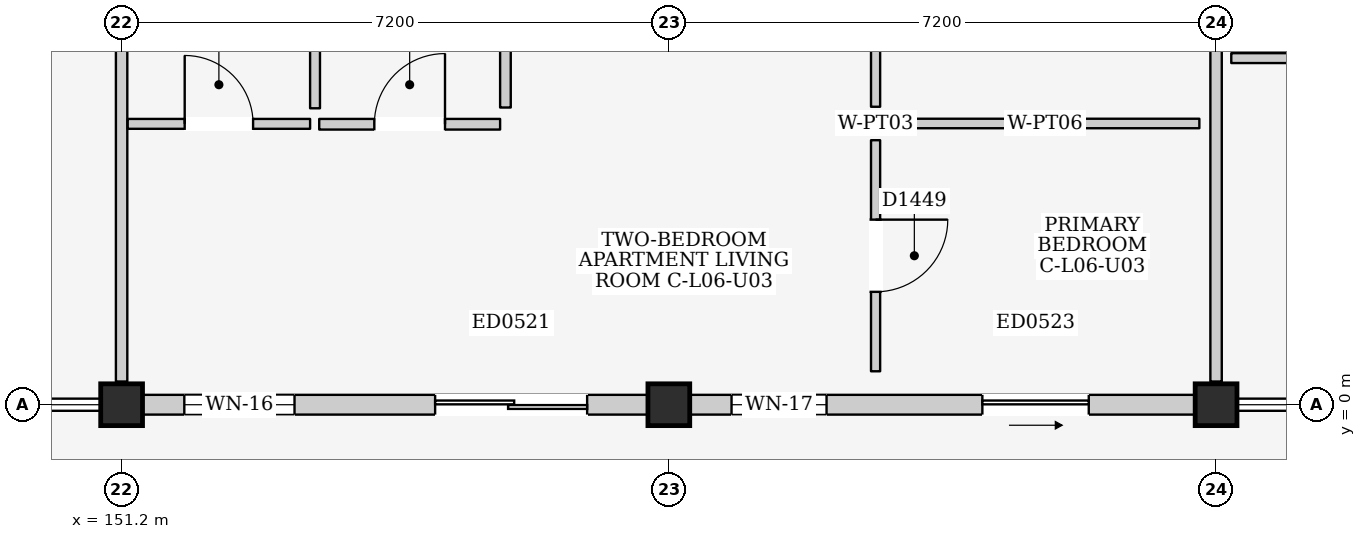
"""IFC4 building model, lengths in metres.
Left out: names, types, materials, properties, quantities, classifications, styles, units other than length and angle.
Written with IfcOpenShell. Run it as: python <this file> out.ifc"""

import sys

from ifc_helpers import new_model, si_unit, direction, frame, frame_2d, origin, origin_2d, place, context, subcontext, project, spatial, rectangle, extrude, element, fill, save


model = new_model("IFC4")
c1 = context("Model", 3, precision=1e-05, world=origin(), true_north=direction((0.0, 1.0)))
c2 = subcontext(c1, "Body", "Model", "MODEL_VIEW")
j1 = project(units=[si_unit("LENGTHUNIT", "METRE"), si_unit("PLANEANGLEUNIT", "RADIAN")], contexts=[c1])
p1 = place(None, origin())
s1 = spatial("IfcSite", under=j1, at=p1, CompositionType="ELEMENT")
p2 = place(p1, origin())
s2 = spatial("IfcBuilding", under=s1, at=p2, CompositionType="ELEMENT")
p3 = place(p2, frame((0.0, 0.0, 21.9)))
s3 = spatial("IfcBuildingStorey", under=s2, at=p3, CompositionType="ELEMENT", Elevation=21.9)
for number, where, z_axis, x_axis in (
    (1, (151.2, 0.0, 0.0), (0.0, 0.0, 1.0), (1.0, 0.0, 0.0)),
    (2, (158.4, 0.0, 0.0), (0.0, 0.0, 1.0), (1.0, 0.0, 0.0)),
    (3, (165.6, 0.0, 0.0), (0.0, 0.0, 1.0), (1.0, 0.0, 0.0)),
):
    element("IfcColumn", number, at=place(p3, frame(where, z_axis=z_axis, x_axis=x_axis)), inside=s3, PredefinedType="COLUMN", context=c2, shape_type="SweptSolid", body=[
        extrude(rectangle(XDim=0.55, YDim=0.55, at=origin_2d()), origin(), (0.0, 0.0, 1.0), 3.2),
    ])
p4 = place(p3, frame((151.475, 0.0, 0.0), z_axis=(0.0, 0.0, 1.0), x_axis=(1.0, 0.0, 0.0)))
e4 = element("IfcWall", 4, at=p4, inside=s3, PredefinedType="ELEMENTEDWALL", context=c2, shape_type="SweptSolid", body=[
    extrude(rectangle(XDim=6.65, YDim=0.26, at=frame_2d((3.325, 0.0))), origin(), (0.0, 0.0, 1.0), 2.515),
])
p5 = place(p4, frame((3.85, 0.0, 0.0)))
e5 = element("IfcOpeningElement", 5, at=p5, cuts=e4, PredefinedType="OPENING", context=c2, shape_type="SweptSolid", body=[
    extrude(rectangle(XDim=2.0, YDim=2.12, at=frame_2d((1.0, 1.06))), frame((0.0, 0.145, 0.0), z_axis=(0.0, -1.0, 0.0), x_axis=(1.0, 0.0, 0.0)), (0.0, 0.0, 1.0), 0.29),
])
p6 = place(p4, frame((0.55, 0.0, 0.9)))
e6 = element("IfcOpeningElement", 6, at=p6, cuts=e4, PredefinedType="OPENING", context=c2, shape_type="SweptSolid", body=[
    extrude(rectangle(XDim=1.45, YDim=1.4, at=frame_2d((0.725, 0.7))), frame((0.0, 0.145, 0.0), z_axis=(0.0, -1.0, 0.0), x_axis=(1.0, 0.0, 0.0)), (0.0, 0.0, 1.0), 0.29),
])
p7 = place(p3, frame((158.675, 0.0, 0.0), z_axis=(0.0, 0.0, 1.0), x_axis=(1.0, 0.0, 0.0)))
e7 = element("IfcWall", 7, at=p7, inside=s3, PredefinedType="ELEMENTEDWALL", context=c2, shape_type="SweptSolid", body=[
    extrude(rectangle(XDim=6.65, YDim=0.26, at=frame_2d((3.325, 0.0))), origin(), (0.0, 0.0, 1.0), 2.515),
])
p8 = place(p7, frame((3.85, 0.0, 0.0)))
e8 = element("IfcOpeningElement", 8, at=p8, cuts=e7, PredefinedType="OPENING", context=c2, shape_type="SweptSolid", body=[
    extrude(rectangle(XDim=1.4, YDim=2.1, at=frame_2d((0.7, 1.05))), frame((0.0, 0.145, 0.0), z_axis=(0.0, -1.0, 0.0), x_axis=(1.0, 0.0, 0.0)), (0.0, 0.0, 1.0), 0.29),
])
p9 = place(p7, frame((0.55, 0.0, 0.9)))
e9 = element("IfcOpeningElement", 9, at=p9, cuts=e7, PredefinedType="OPENING", context=c2, shape_type="SweptSolid", body=[
    extrude(rectangle(XDim=1.25, YDim=1.3, at=frame_2d((0.625, 0.65))), frame((0.0, 0.145, 0.0), z_axis=(0.0, -1.0, 0.0), x_axis=(1.0, 0.0, 0.0)), (0.0, 0.0, 1.0), 0.29),
])
for number, where, z_axis, x_axis in (
    (10, (151.2, 0.305, 0.0), (0.0, 0.0, 1.0), (0.0, 1.0, 0.0)),
    (11, (165.6, 0.305, 0.0), (0.0, 0.0, 1.0), (0.0, 1.0, 0.0)),
):
    element("IfcWall", number, at=place(p3, frame(where, z_axis=z_axis, x_axis=x_axis)), inside=s3, PredefinedType="PARTITIONING", context=c2, shape_type="SweptSolid", body=[
        extrude(rectangle(XDim=6.59, YDim=0.15, at=frame_2d((3.295, 0.0))), origin(), (0.0, 0.0, 1.0), 2.465),
    ])
p10 = place(p3, frame((151.28, 3.695, 0.0), z_axis=(0.0, 0.0, 1.0), x_axis=(1.0, 0.0, 0.0)))
e12 = element("IfcWall", 12, at=p10, inside=s3, PredefinedType="PARTITIONING", context=c2, shape_type="SweptSolid", body=[
    extrude(rectangle(XDim=2.4, YDim=0.13, at=frame_2d((1.2, 0.0))), origin(), (0.0, 0.0, 1.0), 2.98),
])
p11 = place(p10, frame((0.75, 0.0, 0.0)))
e13 = element("IfcOpeningElement", 13, at=p11, cuts=e12, PredefinedType="OPENING", context=c2, shape_type="SweptSolid", body=[
    extrude(rectangle(XDim=0.9, YDim=2.1, at=frame_2d((0.45, 1.05))), frame((0.0, 0.08, 0.0), z_axis=(0.0, -1.0, 0.0), x_axis=(1.0, 0.0, 0.0)), (0.0, 0.0, 1.0), 0.16),
])
p12 = place(p3, frame((153.745, 3.9, 0.0), z_axis=(0.0, 0.0, 1.0), x_axis=(0.0, 1.0, 0.0)))
e14 = element("IfcWall", 14, at=p12, inside=s3, PredefinedType="PARTITIONING", context=c2, shape_type="SweptSolid", body=[
    extrude(rectangle(XDim=3.04, YDim=0.13, at=frame_2d((1.52, 0.0))), origin(), (0.0, 0.0, 1.0), 2.98),
])
p13 = place(p3, frame((153.8, 3.69, 0.0), z_axis=(0.0, 0.0, 1.0), x_axis=(1.0, 0.0, 0.0)))
e15 = element("IfcWall", 15, at=p13, inside=s3, PredefinedType="PARTITIONING", context=c2, shape_type="SweptSolid", body=[
    extrude(rectangle(XDim=2.38, YDim=0.14, at=frame_2d((1.19, 0.0))), origin(), (0.0, 0.0, 1.0), 2.98),
])
p14 = place(p13, frame((0.725, 0.0, 0.0)))
e16 = element("IfcOpeningElement", 16, at=p14, cuts=e15, PredefinedType="OPENING", context=c2, shape_type="SweptSolid", body=[
    extrude(rectangle(XDim=0.93, YDim=2.14, at=frame_2d((0.465, 1.07))), frame((0.0, 0.085, 0.0), z_axis=(0.0, -1.0, 0.0), x_axis=(1.0, 0.0, 0.0)), (0.0, 0.0, 1.0), 0.17),
])
p15 = place(p3, frame((156.25, 3.91, 0.0), z_axis=(0.0, 0.0, 1.0), x_axis=(0.0, 1.0, 0.0)))
e17 = element("IfcWall", 17, at=p15, inside=s3, PredefinedType="PARTITIONING", context=c2, shape_type="SweptSolid", body=[
    extrude(rectangle(XDim=3.06, YDim=0.14, at=frame_2d((1.53, 0.0))), origin(), (0.0, 0.0, 1.0), 2.98),
])
p16 = place(p3, frame((161.12, 0.44, 0.0), z_axis=(0.0, 0.0, 1.0), x_axis=(0.0, 1.0, 0.0)))
e18 = element("IfcWall", 18, at=p16, inside=s3, PredefinedType="PARTITIONING", context=c2, shape_type="SweptSolid", body=[
    extrude(rectangle(XDim=3.04, YDim=0.12, at=frame_2d((1.52, 0.0))), origin(), (0.0, 0.0, 1.0), 2.98),
])
p17 = place(p16, frame((1.045, 0.0, 0.0)))
e19 = element("IfcOpeningElement", 19, at=p17, cuts=e18, PredefinedType="OPENING", context=c2, shape_type="SweptSolid", body=[
    extrude(rectangle(XDim=0.95, YDim=2.15, at=frame_2d((0.475, 1.075))), frame((0.0, 0.075, 0.0), z_axis=(0.0, -1.0, 0.0), x_axis=(1.0, 0.0, 0.0)), (0.0, 0.0, 1.0), 0.15),
])
p18 = place(p3, frame((161.32, 3.7, 0.0), z_axis=(0.0, 0.0, 1.0), x_axis=(1.0, 0.0, 0.0)))
e20 = element("IfcWall", 20, at=p18, inside=s3, PredefinedType="PARTITIONING", context=c2, shape_type="SweptSolid", body=[
    extrude(rectangle(XDim=4.06, YDim=0.125, at=frame_2d((2.03, 0.0))), origin(), (0.0, 0.0, 1.0), 2.98),
])
p19 = place(p3, frame((161.12, 3.92, 0.0), z_axis=(0.0, 0.0, 1.0), x_axis=(0.0, 1.0, 0.0)))
e21 = element("IfcWall", 21, at=p19, inside=s3, PredefinedType="PARTITIONING", context=c2, shape_type="SweptSolid", body=[
    extrude(rectangle(XDim=3.04, YDim=0.12, at=frame_2d((1.52, 0.0))), origin(), (0.0, 0.0, 1.0), 2.98),
])
p20 = place(p19, frame((1.04, 0.0, 0.0)))
e22 = element("IfcOpeningElement", 22, at=p20, cuts=e21, PredefinedType="OPENING", context=c2, shape_type="SweptSolid", body=[
    extrude(rectangle(XDim=0.96, YDim=2.15, at=frame_2d((0.48, 1.075))), frame((0.0, 0.075, 0.0), z_axis=(0.0, -1.0, 0.0), x_axis=(1.0, 0.0, 0.0)), (0.0, 0.0, 1.0), 0.15),
])
p21 = place(p3, frame((165.8, 4.56, 0.0), z_axis=(0.0, 0.0, 1.0), x_axis=(1.0, 0.0, 0.0)))
e23 = element("IfcWall", 23, at=p21, inside=s3, PredefinedType="PARTITIONING", context=c2, shape_type="SweptSolid", body=[
    extrude(rectangle(XDim=2.05, YDim=0.13, at=frame_2d((1.025, 0.0))), origin(), (0.0, 0.0, 1.0), 2.98),
])
p22 = place(p5, frame((2.0, 0.0, 0.0), z_axis=(0.0, 0.0, 1.0), x_axis=(-1.0, 0.0, 0.0)))
e24 = element("IfcDoor", 24, at=p22, inside=s3, OperationType="DOUBLE_DOOR_SLIDING", PredefinedType="DOOR", context=c2, shape_type="SweptSolid", body=[
    extrude(rectangle(XDim=2.0, YDim=2.12, at=frame_2d((1.0, 1.06))), frame((0.0, 0.025, 0.0), z_axis=(0.0, -1.0, 0.0), x_axis=(1.0, 0.0, 0.0)), (0.0, 0.0, 1.0), 0.05),
])
fill(e5, e24)
p23 = place(p6, origin())
e25 = element("IfcWindow", 25, at=p23, inside=s3, PartitioningType="DOUBLE_PANEL_VERTICAL", PredefinedType="WINDOW", context=c2, shape_type="SweptSolid", body=[
    extrude(rectangle(XDim=1.45, YDim=1.4, at=frame_2d((0.725, 0.7))), frame((0.0, 0.03, 0.0), z_axis=(0.0, -1.0, 0.0), x_axis=(1.0, 0.0, 0.0)), (0.0, 0.0, 1.0), 0.06),
])
fill(e6, e25)
p24 = place(p8, frame((1.4, 0.0, 0.0), z_axis=(0.0, 0.0, 1.0), x_axis=(-1.0, 0.0, 0.0)))
e26 = element("IfcDoor", 26, at=p24, inside=s3, OperationType="SLIDING_TO_RIGHT", PredefinedType="DOOR", context=c2, shape_type="SweptSolid", body=[
    extrude(rectangle(XDim=1.4, YDim=2.1, at=frame_2d((0.7, 1.05))), frame((0.0, 0.025, 0.0), z_axis=(0.0, -1.0, 0.0), x_axis=(1.0, 0.0, 0.0)), (0.0, 0.0, 1.0), 0.05),
])
fill(e8, e26)
p25 = place(p9, origin())
e27 = element("IfcWindow", 27, at=p25, inside=s3, PartitioningType="SINGLE_PANEL", PredefinedType="WINDOW", context=c2, shape_type="SweptSolid", body=[
    extrude(rectangle(XDim=1.25, YDim=1.3, at=frame_2d((0.625, 0.65))), frame((0.0, 0.03, 0.0), z_axis=(0.0, -1.0, 0.0), x_axis=(1.0, 0.0, 0.0)), (0.0, 0.0, 1.0), 0.06),
])
fill(e9, e27)
p26 = place(p11, origin())
e28 = element("IfcDoor", 28, at=p26, inside=s3, OperationType="SINGLE_SWING_LEFT", PredefinedType="DOOR", context=c2, shape_type="SweptSolid", body=[
    extrude(rectangle(XDim=0.9, YDim=2.1, at=frame_2d((0.45, 1.05))), frame((0.0, 0.025, 0.0), z_axis=(0.0, -1.0, 0.0), x_axis=(1.0, 0.0, 0.0)), (0.0, 0.0, 1.0), 0.05),
])
fill(e13, e28)
p27 = place(p14, origin())
e29 = element("IfcDoor", 29, at=p27, inside=s3, OperationType="SINGLE_SWING_RIGHT", PredefinedType="DOOR", context=c2, shape_type="SweptSolid", body=[
    extrude(rectangle(XDim=0.93, YDim=2.14, at=frame_2d((0.465, 1.07))), frame((0.0, 0.025, 0.0), z_axis=(0.0, -1.0, 0.0), x_axis=(1.0, 0.0, 0.0)), (0.0, 0.0, 1.0), 0.05),
])
fill(e16, e29)
p28 = place(p17, frame((0.95, 0.0, 0.0), z_axis=(0.0, 0.0, 1.0), x_axis=(-1.0, 0.0, 0.0)))
e30 = element("IfcDoor", 30, at=p28, inside=s3, OperationType="SINGLE_SWING_LEFT", PredefinedType="DOOR", context=c2, shape_type="SweptSolid", body=[
    extrude(rectangle(XDim=0.95, YDim=2.15, at=frame_2d((0.475, 1.075))), frame((0.0, 0.025, 0.0), z_axis=(0.0, -1.0, 0.0), x_axis=(1.0, 0.0, 0.0)), (0.0, 0.0, 1.0), 0.05),
])
fill(e19, e30)
save(model, sys.argv[1])
